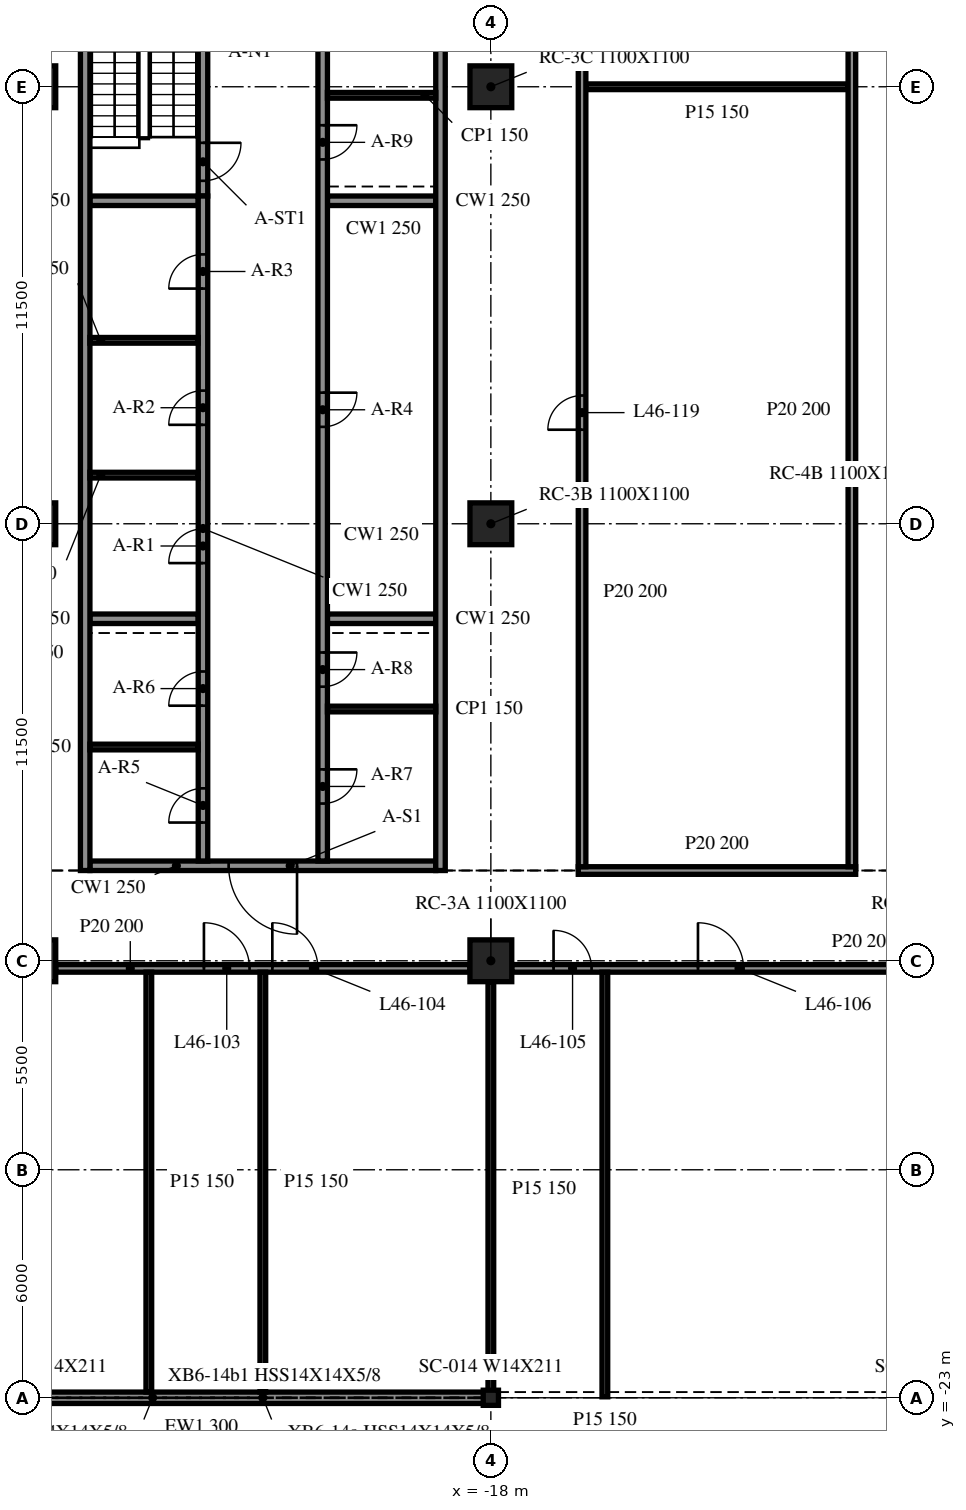
"""IFC4 building model, lengths in metres.
Left out: names, types, materials, properties, quantities, classifications, styles, units other than length and angle.
Written with IfcOpenShell. Run it as: python <this file> out.ifc"""

import sys

from ifc_helpers import new_model, si_unit, direction, frame, frame_2d, origin, origin_2d, place, context, subcontext, project, spatial, rectangle, i_section, extrude, element, fill, save


model = new_model("IFC4")
c1 = context("Model", 3, precision=1e-05, world=origin(), true_north=direction((0.0, 1.0)))
c2 = subcontext(c1, "Body", "Model", "MODEL_VIEW")
j1 = project(units=[si_unit("LENGTHUNIT", "METRE"), si_unit("PLANEANGLEUNIT", "RADIAN")], contexts=[c1])
p1 = place(None, origin())
s1 = spatial("IfcSite", under=j1, at=p1, CompositionType="ELEMENT")
p2 = place(p1, origin())
s2 = spatial("IfcBuilding", under=s1, at=p2, CompositionType="ELEMENT")
p3 = place(p2, frame((0.0, 0.0, 193.9)))
s3 = spatial("IfcBuildingStorey", under=s2, at=p3, CompositionType="ELEMENT", Elevation=193.9)
for number, where, z_axis, x_axis in (
    (1, (-30.0, -11.5, -0.34), (0.0, 0.0, 1.0), (1.0, 0.0, 0.0)),
    (2, (-30.0, 0.0, -0.34), (0.0, 0.0, 1.0), (1.0, 0.0, 0.0)),
    (3, (-30.0, 11.5, -0.34), (0.0, 0.0, 1.0), (1.0, 0.0, 0.0)),
    (4, (-18.0, -11.5, -0.34), (0.0, 0.0, 1.0), (1.0, 0.0, 0.0)),
    (5, (-18.0, 0.0, -0.34), (0.0, 0.0, 1.0), (1.0, 0.0, 0.0)),
    (6, (-18.0, 11.5, -0.34), (0.0, 0.0, 1.0), (1.0, 0.0, 0.0)),
):
    element("IfcColumn", number, at=place(p3, frame(where, z_axis=z_axis, x_axis=x_axis)), inside=s3, PredefinedType="COLUMN", context=c2, shape_type="SweptSolid", body=[
        extrude(rectangle(XDim=1.1, YDim=1.1, at=origin_2d()), origin(), (0.0, 0.0, 1.0), 3.8),
    ])
p4 = place(p3, frame((-18.0, -23.0, -0.34), z_axis=(0.0, 0.0, 1.0), x_axis=(1.0, 0.0, 0.0)))
e7 = element("IfcColumn", 7, at=p4, inside=s3, PredefinedType="COLUMN", context=c2, shape_type="SweptSolid", body=[
    extrude(i_section(OverallWidth=0.401, OverallDepth=0.399, WebThickness=0.025, FlangeThickness=0.04, at=origin_2d()), origin(), (0.0, 0.0, 1.0), 3.8),
])
p5 = place(p3, frame((-29.988, -23.0, 0.0), z_axis=(0.0, 0.0, 1.0), x_axis=(1.0, 0.0, 0.0)))
e8 = element("IfcWall", 8, at=p5, inside=s3, PredefinedType="NOTDEFINED", context=c2, shape_type="SweptSolid", body=[
    extrude(rectangle(XDim=11.975, YDim=0.3, at=frame_2d((5.988, 0.0))), origin(), (0.0, 0.0, 1.0), 2.782),
])
for number, where, z_axis, x_axis in (
    (9, (-28.675, 15.125, 0.0), (0.0, 0.0, 1.0), (0.0, -1.0, 0.0)),
    (10, (-19.325, -9.125, 0.0), (0.0, 0.0, 1.0), (0.0, 1.0, 0.0)),
):
    element("IfcWall", number, at=place(p3, frame(where, z_axis=z_axis, x_axis=x_axis)), inside=s3, PredefinedType="SOLIDWALL", context=c2, shape_type="SweptSolid", body=[
        extrude(rectangle(XDim=24.25, YDim=0.25, at=frame_2d((12.125, 0.0))), origin(), (0.0, 0.0, 1.0), 3.46),
    ])
p6 = place(p3, frame((-19.45, -9.0, 0.0), z_axis=(0.0, 0.0, 1.0), x_axis=(-1.0, 0.0, 0.0)))
e11 = element("IfcWall", 11, at=p6, inside=s3, PredefinedType="SOLIDWALL", context=c2, shape_type="SweptSolid", body=[
    extrude(rectangle(XDim=9.1, YDim=0.25, at=frame_2d((4.55, 0.0))), origin(), (0.0, 0.0, 1.0), 3.46),
])
p7 = place(p6, frame((3.65, 0.0, 0.0)))
e12 = element("IfcOpeningElement", 12, at=p7, cuts=e11, PredefinedType="OPENING", context=c2, shape_type="SweptSolid", body=[
    extrude(rectangle(XDim=1.8, YDim=2.1, at=frame_2d((0.9, 1.05))), frame((0.0, 0.135, 0.0), z_axis=(0.0, -1.0, 0.0), x_axis=(1.0, 0.0, 0.0)), (0.0, 0.0, 1.0), 0.27),
])
p8 = place(p3, frame((-25.575, -8.875, 0.0), z_axis=(0.0, 0.0, 1.0), x_axis=(0.0, 1.0, 0.0)))
e13 = element("IfcWall", 13, at=p8, inside=s3, PredefinedType="SOLIDWALL", context=c2, shape_type="SweptSolid", body=[
    extrude(rectangle(XDim=17.5, YDim=0.25, at=frame_2d((8.75, 0.0))), origin(), (0.0, 0.0, 1.0), 3.46),
])
p9 = place(p8, frame((7.84, 0.0, 0.0)))
e14 = element("IfcOpeningElement", 14, at=p9, cuts=e13, PredefinedType="OPENING", context=c2, shape_type="SweptSolid", body=[
    extrude(rectangle(XDim=0.9, YDim=2.1, at=frame_2d((0.45, 1.05))), frame((0.0, 0.135, 0.0), z_axis=(0.0, -1.0, 0.0), x_axis=(1.0, 0.0, 0.0)), (0.0, 0.0, 1.0), 0.27),
])
p10 = place(p8, frame((11.479, 0.0, 0.0)))
e15 = element("IfcOpeningElement", 15, at=p10, cuts=e13, PredefinedType="OPENING", context=c2, shape_type="SweptSolid", body=[
    extrude(rectangle(XDim=0.9, YDim=2.1, at=frame_2d((0.45, 1.05))), frame((0.0, 0.135, 0.0), z_axis=(0.0, -1.0, 0.0), x_axis=(1.0, 0.0, 0.0)), (0.0, 0.0, 1.0), 0.27),
])
p11 = place(p8, frame((15.064, 0.0, 0.0)))
e16 = element("IfcOpeningElement", 16, at=p11, cuts=e13, PredefinedType="OPENING", context=c2, shape_type="SweptSolid", body=[
    extrude(rectangle(XDim=0.9, YDim=2.1, at=frame_2d((0.45, 1.05))), frame((0.0, 0.135, 0.0), z_axis=(0.0, -1.0, 0.0), x_axis=(1.0, 0.0, 0.0)), (0.0, 0.0, 1.0), 0.27),
])
p12 = place(p8, frame((1.012, 0.0, 0.0)))
e17 = element("IfcOpeningElement", 17, at=p12, cuts=e13, PredefinedType="OPENING", context=c2, shape_type="SweptSolid", body=[
    extrude(rectangle(XDim=0.9, YDim=2.1, at=frame_2d((0.45, 1.05))), frame((0.0, 0.135, 0.0), z_axis=(0.0, -1.0, 0.0), x_axis=(1.0, 0.0, 0.0)), (0.0, 0.0, 1.0), 0.27),
])
p13 = place(p8, frame((4.087, 0.0, 0.0)))
e18 = element("IfcOpeningElement", 18, at=p13, cuts=e13, PredefinedType="OPENING", context=c2, shape_type="SweptSolid", body=[
    extrude(rectangle(XDim=0.9, YDim=2.1, at=frame_2d((0.45, 1.05))), frame((0.0, 0.135, 0.0), z_axis=(0.0, -1.0, 0.0), x_axis=(1.0, 0.0, 0.0)), (0.0, 0.0, 1.0), 0.27),
])
p14 = place(p3, frame((-25.575, 14.875, 0.0), z_axis=(0.0, 0.0, 1.0), x_axis=(0.0, -1.0, 0.0)))
e19 = element("IfcWall", 19, at=p14, inside=s3, PredefinedType="SOLIDWALL", context=c2, shape_type="SweptSolid", body=[
    extrude(rectangle(XDim=6.25, YDim=0.25, at=frame_2d((3.125, 0.0))), origin(), (0.0, 0.0, 1.0), 3.46),
])
p15 = place(p14, frame((4.85, 0.0, 0.0)))
e20 = element("IfcOpeningElement", 20, at=p15, cuts=e19, PredefinedType="OPENING", context=c2, shape_type="SweptSolid", body=[
    extrude(rectangle(XDim=1.0, YDim=2.1, at=frame_2d((0.5, 1.05))), frame((0.0, 0.135, 0.0), z_axis=(0.0, -1.0, 0.0), x_axis=(1.0, 0.0, 0.0)), (0.0, 0.0, 1.0), 0.27),
])
p16 = place(p3, frame((-22.425, 14.875, 0.0), z_axis=(0.0, 0.0, 1.0), x_axis=(0.0, -1.0, 0.0)))
e21 = element("IfcWall", 21, at=p16, inside=s3, PredefinedType="SOLIDWALL", context=c2, shape_type="SweptSolid", body=[
    extrude(rectangle(XDim=23.75, YDim=0.25, at=frame_2d((11.875, 0.0))), origin(), (0.0, 0.0, 1.0), 3.46),
])
p17 = place(p16, frame((11.425, 0.0, 0.0)))
e22 = element("IfcOpeningElement", 22, at=p17, cuts=e21, PredefinedType="OPENING", context=c2, shape_type="SweptSolid", body=[
    extrude(rectangle(XDim=0.9, YDim=2.1, at=frame_2d((0.45, 1.05))), frame((0.0, 0.135, 0.0), z_axis=(0.0, -1.0, 0.0), x_axis=(1.0, 0.0, 0.0)), (0.0, 0.0, 1.0), 0.27),
])
p18 = place(p16, frame((21.337, 0.0, 0.0)))
e23 = element("IfcOpeningElement", 23, at=p18, cuts=e21, PredefinedType="OPENING", context=c2, shape_type="SweptSolid", body=[
    extrude(rectangle(XDim=0.9, YDim=2.1, at=frame_2d((0.45, 1.05))), frame((0.0, 0.135, 0.0), z_axis=(0.0, -1.0, 0.0), x_axis=(1.0, 0.0, 0.0)), (0.0, 0.0, 1.0), 0.27),
])
p19 = place(p16, frame((18.262, 0.0, 0.0)))
e24 = element("IfcOpeningElement", 24, at=p19, cuts=e21, PredefinedType="OPENING", context=c2, shape_type="SweptSolid", body=[
    extrude(rectangle(XDim=0.9, YDim=2.1, at=frame_2d((0.45, 1.05))), frame((0.0, 0.135, 0.0), z_axis=(0.0, -1.0, 0.0), x_axis=(1.0, 0.0, 0.0)), (0.0, 0.0, 1.0), 0.27),
])
p20 = place(p16, frame((4.387, 0.0, 0.0)))
e25 = element("IfcOpeningElement", 25, at=p20, cuts=e21, PredefinedType="OPENING", context=c2, shape_type="SweptSolid", body=[
    extrude(rectangle(XDim=0.9, YDim=2.1, at=frame_2d((0.45, 1.05))), frame((0.0, 0.135, 0.0), z_axis=(0.0, -1.0, 0.0), x_axis=(1.0, 0.0, 0.0)), (0.0, 0.0, 1.0), 0.27),
])
p21 = place(p16, frame((1.312, 0.0, 0.0)))
e26 = element("IfcOpeningElement", 26, at=p21, cuts=e21, PredefinedType="OPENING", context=c2, shape_type="SweptSolid", body=[
    extrude(rectangle(XDim=0.9, YDim=2.1, at=frame_2d((0.45, 1.05))), frame((0.0, 0.135, 0.0), z_axis=(0.0, -1.0, 0.0), x_axis=(1.0, 0.0, 0.0)), (0.0, 0.0, 1.0), 0.27),
])
for number, where, z_axis, x_axis in (
    (27, (-28.55, -2.5, 0.0), (0.0, 0.0, 1.0), (1.0, 0.0, 0.0)),
    (28, (-28.55, 8.5, 0.0), (0.0, 0.0, 1.0), (1.0, 0.0, 0.0)),
    (29, (-22.3, -2.5, 0.0), (0.0, 0.0, 1.0), (1.0, 0.0, 0.0)),
    (30, (-22.3, 8.5, 0.0), (0.0, 0.0, 1.0), (1.0, 0.0, 0.0)),
):
    element("IfcWall", number, at=place(p3, frame(where, z_axis=z_axis, x_axis=x_axis)), inside=s3, PredefinedType="SOLIDWALL", context=c2, shape_type="SweptSolid", body=[
        extrude(rectangle(XDim=2.85, YDim=0.25, at=frame_2d((1.425, 0.0))), origin(), (0.0, 0.0, 1.0), 3.46),
    ])
for number, where, z_axis, x_axis in (
    (31, (-28.55, 1.28, 0.0), (0.0, 0.0, 1.0), (1.0, 0.0, 0.0)),
    (32, (-28.55, 4.827, 0.0), (0.0, 0.0, 1.0), (1.0, 0.0, 0.0)),
    (33, (-28.55, -5.875, 0.0), (0.0, 0.0, 1.0), (1.0, 0.0, 0.0)),
    (34, (-22.3, -4.875, 0.0), (0.0, 0.0, 1.0), (1.0, 0.0, 0.0)),
    (35, (-22.3, 11.275, 0.0), (0.0, 0.0, 1.0), (1.0, 0.0, 0.0)),
):
    element("IfcWall", number, at=place(p3, frame(where, z_axis=z_axis, x_axis=x_axis)), inside=s3, PredefinedType="PARTITIONING", context=c2, shape_type="SweptSolid", body=[
        extrude(rectangle(XDim=2.85, YDim=0.15, at=frame_2d((1.425, 0.0))), origin(), (0.0, 0.0, 1.0), 3.46),
    ])
p22 = place(p3, frame((-29.45, -11.7, 0.0), z_axis=(0.0, 0.0, 1.0), x_axis=(1.0, 0.0, 0.0)))
e36 = element("IfcWall", 36, at=p22, inside=s3, PredefinedType="PARTITIONING", context=c2, shape_type="SweptSolid", body=[
    extrude(rectangle(XDim=10.9, YDim=0.2, at=frame_2d((5.45, 0.0))), origin(), (0.0, 0.0, 1.0), 3.46),
])
p23 = place(p22, frame((3.9, 0.0, 0.0)))
e37 = element("IfcOpeningElement", 37, at=p23, cuts=e36, PredefinedType="OPENING", context=c2, shape_type="SweptSolid", body=[
    extrude(rectangle(XDim=1.2, YDim=2.1, at=frame_2d((0.6, 1.05))), frame((0.0, 0.11, 0.0), z_axis=(0.0, -1.0, 0.0), x_axis=(1.0, 0.0, 0.0)), (0.0, 0.0, 1.0), 0.22),
])
p24 = place(p22, frame((5.7, 0.0, 0.0)))
e38 = element("IfcOpeningElement", 38, at=p24, cuts=e36, PredefinedType="OPENING", context=c2, shape_type="SweptSolid", body=[
    extrude(rectangle(XDim=1.2, YDim=2.1, at=frame_2d((0.6, 1.05))), frame((0.0, 0.11, 0.0), z_axis=(0.0, -1.0, 0.0), x_axis=(1.0, 0.0, 0.0)), (0.0, 0.0, 1.0), 0.22),
])
p25 = place(p3, frame((-17.45, -11.7, 0.0), z_axis=(0.0, 0.0, 1.0), x_axis=(1.0, 0.0, 0.0)))
e39 = element("IfcWall", 39, at=p25, inside=s3, PredefinedType="PARTITIONING", context=c2, shape_type="SweptSolid", body=[
    extrude(rectangle(XDim=10.9, YDim=0.2, at=frame_2d((5.45, 0.0))), origin(), (0.0, 0.0, 1.0), 3.46),
])
p26 = place(p25, frame((1.1, 0.0, 0.0)))
e40 = element("IfcOpeningElement", 40, at=p26, cuts=e39, PredefinedType="OPENING", context=c2, shape_type="SweptSolid", body=[
    extrude(rectangle(XDim=1.0, YDim=2.1, at=frame_2d((0.5, 1.05))), frame((0.0, 0.11, 0.0), z_axis=(0.0, -1.0, 0.0), x_axis=(1.0, 0.0, 0.0)), (0.0, 0.0, 1.0), 0.22),
])
p27 = place(p25, frame((4.9, 0.0, 0.0)))
e41 = element("IfcOpeningElement", 41, at=p27, cuts=e39, PredefinedType="OPENING", context=c2, shape_type="SweptSolid", body=[
    extrude(rectangle(XDim=1.2, YDim=2.1, at=frame_2d((0.6, 1.05))), frame((0.0, 0.11, 0.0), z_axis=(0.0, -1.0, 0.0), x_axis=(1.0, 0.0, 0.0)), (0.0, 0.0, 1.0), 0.22),
])
p28 = place(p3, frame((-15.7, -9.125, 0.0), z_axis=(0.0, 0.0, 1.0), x_axis=(1.0, 0.0, 0.0)))
e42 = element("IfcWall", 42, at=p28, inside=s3, PredefinedType="PARTITIONING", context=c2, shape_type="SweptSolid", body=[
    extrude(rectangle(XDim=7.3, YDim=0.2, at=frame_2d((3.65, 0.0))), origin(), (0.0, 0.0, 1.0), 3.46),
])
p29 = place(p3, frame((-15.5, 11.5, 0.0), z_axis=(0.0, 0.0, 1.0), x_axis=(1.0, 0.0, 0.0)))
e43 = element("IfcWall", 43, at=p29, inside=s3, PredefinedType="PARTITIONING", context=c2, shape_type="SweptSolid", body=[
    extrude(rectangle(XDim=6.9, YDim=0.15, at=frame_2d((3.45, 0.0))), origin(), (0.0, 0.0, 1.0), 3.46),
])
for number, where, z_axis, x_axis in (
    (44, (-27.0, -22.85, 0.0), (0.0, 0.0, 1.0), (0.0, 1.0, 0.0)),
    (45, (-24.0, -22.85, 0.0), (0.0, 0.0, 1.0), (0.0, 1.0, 0.0)),
):
    element("IfcWall", number, at=place(p3, frame(where, z_axis=z_axis, x_axis=x_axis)), inside=s3, PredefinedType="PARTITIONING", context=c2, shape_type="SweptSolid", body=[
        extrude(rectangle(XDim=11.05, YDim=0.15, at=frame_2d((5.525, 0.0))), origin(), (0.0, 0.0, 1.0), 3.46),
    ])
p30 = place(p3, frame((-18.0, -22.975, 0.0), z_axis=(0.0, 0.0, 1.0), x_axis=(0.0, 1.0, 0.0)))
e46 = element("IfcWall", 46, at=p30, inside=s3, PredefinedType="PARTITIONING", context=c2, shape_type="SweptSolid", body=[
    extrude(rectangle(XDim=10.925, YDim=0.15, at=frame_2d((5.462, 0.0))), origin(), (0.0, 0.0, 1.0), 3.46),
])
p31 = place(p3, frame((-15.6, -9.025, 0.0), z_axis=(0.0, 0.0, 1.0), x_axis=(0.0, 1.0, 0.0)))
e47 = element("IfcWall", 47, at=p31, inside=s3, PredefinedType="PARTITIONING", context=c2, shape_type="SweptSolid", body=[
    extrude(rectangle(XDim=24.05, YDim=0.2, at=frame_2d((12.025, 0.0))), origin(), (0.0, 0.0, 1.0), 3.46),
])
p32 = place(p31, frame((11.5, 0.0, 0.0)))
e48 = element("IfcOpeningElement", 48, at=p32, cuts=e47, PredefinedType="OPENING", context=c2, shape_type="SweptSolid", body=[
    extrude(rectangle(XDim=0.9, YDim=2.1, at=frame_2d((0.45, 1.05))), frame((0.0, 0.11, 0.0), z_axis=(0.0, -1.0, 0.0), x_axis=(1.0, 0.0, 0.0)), (0.0, 0.0, 1.0), 0.22),
])
p33 = place(p3, frame((-15.0, -22.975, 0.0), z_axis=(0.0, 0.0, 1.0), x_axis=(0.0, 1.0, 0.0)))
e49 = element("IfcWall", 49, at=p33, inside=s3, PredefinedType="PARTITIONING", context=c2, shape_type="SweptSolid", body=[
    extrude(rectangle(XDim=11.175, YDim=0.15, at=frame_2d((5.587, 0.0))), origin(), (0.0, 0.0, 1.0), 3.46),
])
p34 = place(p3, frame((-8.5, -9.025, 0.0), z_axis=(0.0, 0.0, 1.0), x_axis=(0.0, 1.0, 0.0)))
e50 = element("IfcWall", 50, at=p34, inside=s3, PredefinedType="PARTITIONING", context=c2, shape_type="SweptSolid", body=[
    extrude(rectangle(XDim=24.05, YDim=0.2, at=frame_2d((12.025, 0.0))), origin(), (0.0, 0.0, 1.0), 3.46),
])
p35 = place(p7, origin())
e51 = element("IfcDoor", 51, at=p35, inside=s3, OperationType="DOUBLE_DOOR_SINGLE_SWING", PredefinedType="DOOR", context=c2, shape_type="SweptSolid", body=[
    extrude(rectangle(XDim=1.8, YDim=2.1, at=frame_2d((0.9, 1.05))), frame((0.0, 0.025, 0.0), z_axis=(0.0, -1.0, 0.0), x_axis=(1.0, 0.0, 0.0)), (0.0, 0.0, 1.0), 0.05),
])
fill(e12, e51)
p36 = place(p9, origin())
e52 = element("IfcDoor", 52, at=p36, inside=s3, OperationType="SINGLE_SWING_LEFT", PredefinedType="DOOR", context=c2, shape_type="SweptSolid", body=[
    extrude(rectangle(XDim=0.9, YDim=2.1, at=frame_2d((0.45, 1.05))), frame((0.0, 0.025, 0.0), z_axis=(0.0, -1.0, 0.0), x_axis=(1.0, 0.0, 0.0)), (0.0, 0.0, 1.0), 0.05),
])
fill(e14, e52)
p37 = place(p10, origin())
e53 = element("IfcDoor", 53, at=p37, inside=s3, OperationType="SINGLE_SWING_RIGHT", PredefinedType="DOOR", context=c2, shape_type="SweptSolid", body=[
    extrude(rectangle(XDim=0.9, YDim=2.1, at=frame_2d((0.45, 1.05))), frame((0.0, 0.025, 0.0), z_axis=(0.0, -1.0, 0.0), x_axis=(1.0, 0.0, 0.0)), (0.0, 0.0, 1.0), 0.05),
])
fill(e15, e53)
p38 = place(p11, origin())
e54 = element("IfcDoor", 54, at=p38, inside=s3, OperationType="SINGLE_SWING_LEFT", PredefinedType="DOOR", context=c2, shape_type="SweptSolid", body=[
    extrude(rectangle(XDim=0.9, YDim=2.1, at=frame_2d((0.45, 1.05))), frame((0.0, 0.025, 0.0), z_axis=(0.0, -1.0, 0.0), x_axis=(1.0, 0.0, 0.0)), (0.0, 0.0, 1.0), 0.05),
])
fill(e16, e54)
p39 = place(p17, origin())
e55 = element("IfcDoor", 55, at=p39, inside=s3, OperationType="SINGLE_SWING_RIGHT", PredefinedType="DOOR", context=c2, shape_type="SweptSolid", body=[
    extrude(rectangle(XDim=0.9, YDim=2.1, at=frame_2d((0.45, 1.05))), frame((0.0, 0.025, 0.0), z_axis=(0.0, -1.0, 0.0), x_axis=(1.0, 0.0, 0.0)), (0.0, 0.0, 1.0), 0.05),
])
fill(e22, e55)
p40 = place(p12, origin())
e56 = element("IfcDoor", 56, at=p40, inside=s3, OperationType="SINGLE_SWING_LEFT", PredefinedType="DOOR", context=c2, shape_type="SweptSolid", body=[
    extrude(rectangle(XDim=0.9, YDim=2.1, at=frame_2d((0.45, 1.05))), frame((0.0, 0.025, 0.0), z_axis=(0.0, -1.0, 0.0), x_axis=(1.0, 0.0, 0.0)), (0.0, 0.0, 1.0), 0.05),
])
fill(e17, e56)
p41 = place(p13, origin())
e57 = element("IfcDoor", 57, at=p41, inside=s3, OperationType="SINGLE_SWING_RIGHT", PredefinedType="DOOR", context=c2, shape_type="SweptSolid", body=[
    extrude(rectangle(XDim=0.9, YDim=2.1, at=frame_2d((0.45, 1.05))), frame((0.0, 0.025, 0.0), z_axis=(0.0, -1.0, 0.0), x_axis=(1.0, 0.0, 0.0)), (0.0, 0.0, 1.0), 0.05),
])
fill(e18, e57)
p42 = place(p18, origin())
e58 = element("IfcDoor", 58, at=p42, inside=s3, OperationType="SINGLE_SWING_LEFT", PredefinedType="DOOR", context=c2, shape_type="SweptSolid", body=[
    extrude(rectangle(XDim=0.9, YDim=2.1, at=frame_2d((0.45, 1.05))), frame((0.0, 0.025, 0.0), z_axis=(0.0, -1.0, 0.0), x_axis=(1.0, 0.0, 0.0)), (0.0, 0.0, 1.0), 0.05),
])
fill(e23, e58)
p43 = place(p19, origin())
e59 = element("IfcDoor", 59, at=p43, inside=s3, OperationType="SINGLE_SWING_RIGHT", PredefinedType="DOOR", context=c2, shape_type="SweptSolid", body=[
    extrude(rectangle(XDim=0.9, YDim=2.1, at=frame_2d((0.45, 1.05))), frame((0.0, 0.025, 0.0), z_axis=(0.0, -1.0, 0.0), x_axis=(1.0, 0.0, 0.0)), (0.0, 0.0, 1.0), 0.05),
])
fill(e24, e59)
p44 = place(p20, origin())
e60 = element("IfcDoor", 60, at=p44, inside=s3, OperationType="SINGLE_SWING_LEFT", PredefinedType="DOOR", context=c2, shape_type="SweptSolid", body=[
    extrude(rectangle(XDim=0.9, YDim=2.1, at=frame_2d((0.45, 1.05))), frame((0.0, 0.025, 0.0), z_axis=(0.0, -1.0, 0.0), x_axis=(1.0, 0.0, 0.0)), (0.0, 0.0, 1.0), 0.05),
])
fill(e25, e60)
p45 = place(p15, origin())
e61 = element("IfcDoor", 61, at=p45, inside=s3, OperationType="SINGLE_SWING_LEFT", PredefinedType="DOOR", context=c2, shape_type="SweptSolid", body=[
    extrude(rectangle(XDim=1.0, YDim=2.1, at=frame_2d((0.5, 1.05))), frame((0.0, 0.025, 0.0), z_axis=(0.0, -1.0, 0.0), x_axis=(1.0, 0.0, 0.0)), (0.0, 0.0, 1.0), 0.05),
])
fill(e20, e61)
p46 = place(p23, origin())
e62 = element("IfcDoor", 62, at=p46, inside=s3, OperationType="SINGLE_SWING_RIGHT", PredefinedType="DOOR", context=c2, shape_type="SweptSolid", body=[
    extrude(rectangle(XDim=1.2, YDim=2.1, at=frame_2d((0.6, 1.05))), frame((0.0, 0.025, 0.0), z_axis=(0.0, -1.0, 0.0), x_axis=(1.0, 0.0, 0.0)), (0.0, 0.0, 1.0), 0.05),
])
fill(e37, e62)
p47 = place(p24, origin())
e63 = element("IfcDoor", 63, at=p47, inside=s3, OperationType="SINGLE_SWING_LEFT", PredefinedType="DOOR", context=c2, shape_type="SweptSolid", body=[
    extrude(rectangle(XDim=1.2, YDim=2.1, at=frame_2d((0.6, 1.05))), frame((0.0, 0.025, 0.0), z_axis=(0.0, -1.0, 0.0), x_axis=(1.0, 0.0, 0.0)), (0.0, 0.0, 1.0), 0.05),
])
fill(e38, e63)
p48 = place(p26, origin())
e64 = element("IfcDoor", 64, at=p48, inside=s3, OperationType="SINGLE_SWING_RIGHT", PredefinedType="DOOR", context=c2, shape_type="SweptSolid", body=[
    extrude(rectangle(XDim=1.0, YDim=2.1, at=frame_2d((0.5, 1.05))), frame((0.0, 0.025, 0.0), z_axis=(0.0, -1.0, 0.0), x_axis=(1.0, 0.0, 0.0)), (0.0, 0.0, 1.0), 0.05),
])
fill(e40, e64)
p49 = place(p27, origin())
e65 = element("IfcDoor", 65, at=p49, inside=s3, OperationType="SINGLE_SWING_LEFT", PredefinedType="DOOR", context=c2, shape_type="SweptSolid", body=[
    extrude(rectangle(XDim=1.2, YDim=2.1, at=frame_2d((0.6, 1.05))), frame((0.0, 0.025, 0.0), z_axis=(0.0, -1.0, 0.0), x_axis=(1.0, 0.0, 0.0)), (0.0, 0.0, 1.0), 0.05),
])
fill(e41, e65)
p50 = place(p32, origin())
e66 = element("IfcDoor", 66, at=p50, inside=s3, OperationType="SINGLE_SWING_RIGHT", PredefinedType="DOOR", context=c2, shape_type="SweptSolid", body=[
    extrude(rectangle(XDim=0.9, YDim=2.1, at=frame_2d((0.45, 1.05))), frame((0.0, 0.025, 0.0), z_axis=(0.0, -1.0, 0.0), x_axis=(1.0, 0.0, 0.0)), (0.0, 0.0, 1.0), 0.05),
])
fill(e48, e66)
save(model, sys.argv[1])
